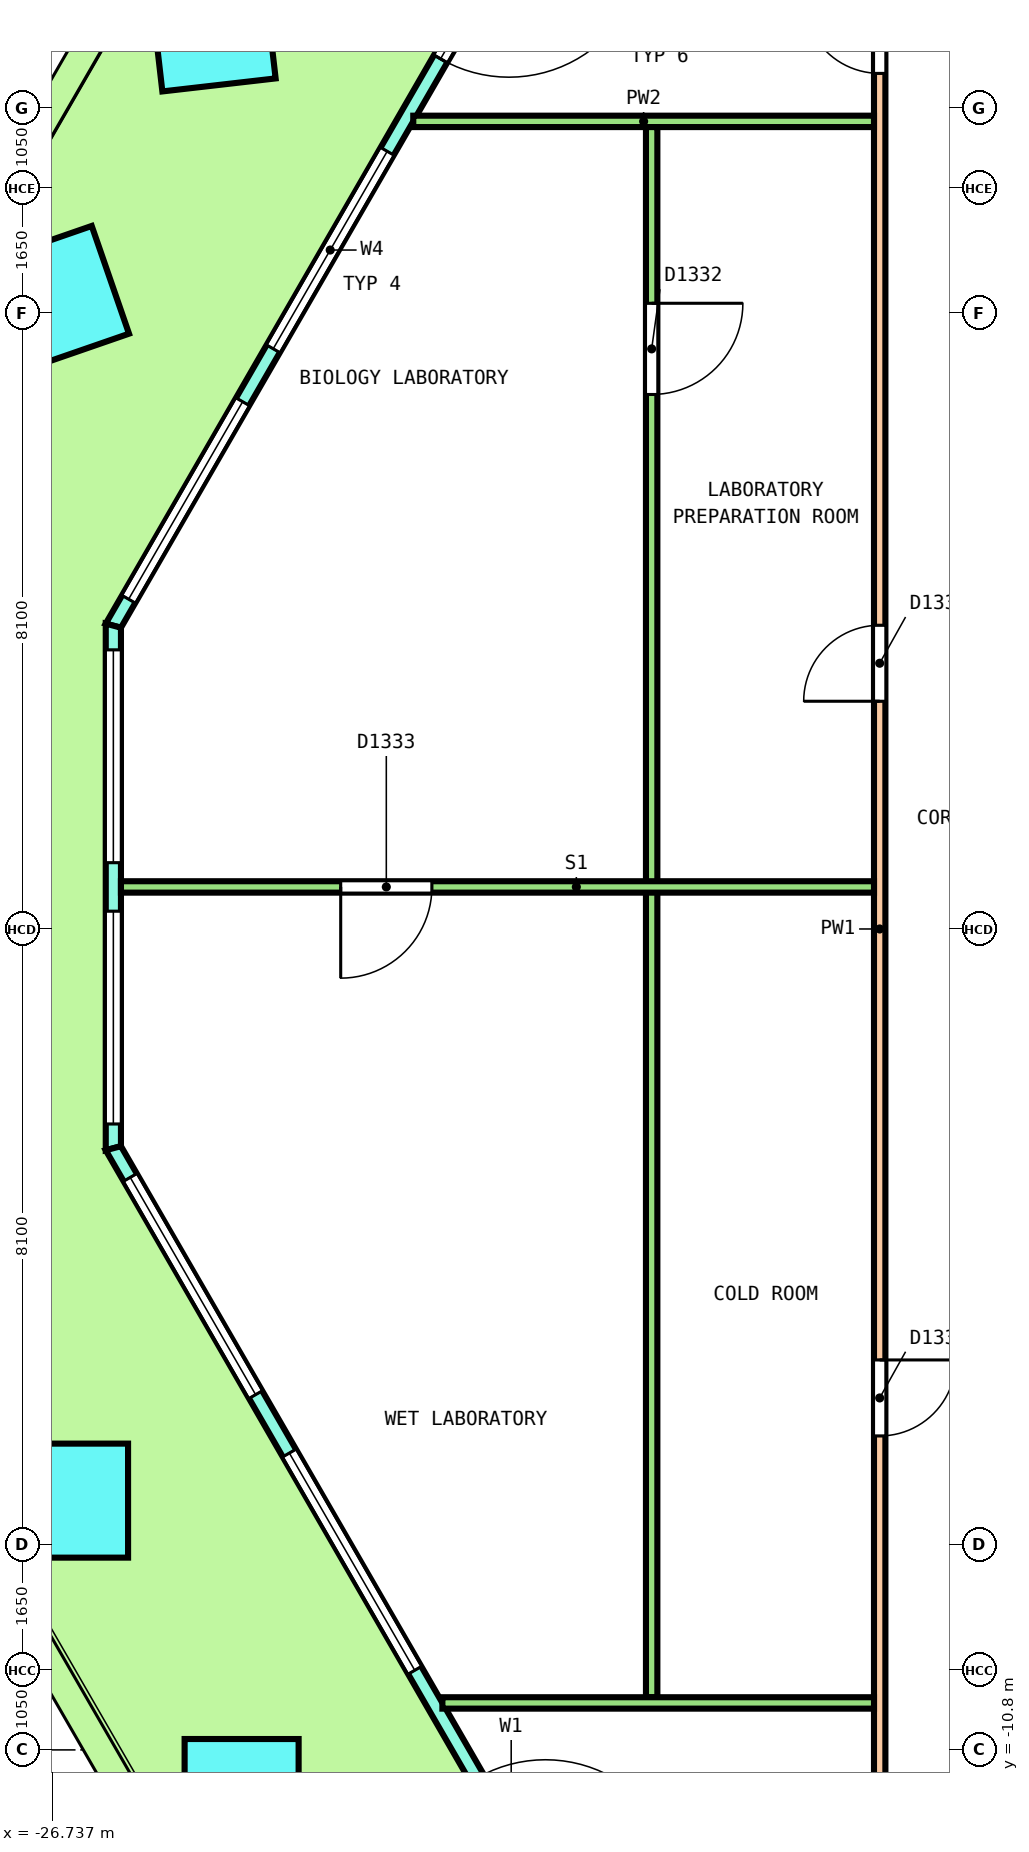
"""IFC4 building model, lengths in metres.
Left out: names, types, materials, properties, quantities, classifications, styles, units other than length and angle.
Written with IfcOpenShell. Run it as: python <this file> out.ifc"""

import sys

from ifc_helpers import new_model, si_unit, direction, frame, frame_2d, origin, origin_2d, place, context, subcontext, project, spatial, polyline, rectangle, outline, extrude, element, fill, save


model = new_model("IFC4")
c1 = context("Model", 3, precision=1e-05, world=origin(), true_north=direction((0.0, 1.0)))
c2 = subcontext(c1, "Body", "Model", "MODEL_VIEW")
j1 = project(units=[si_unit("LENGTHUNIT", "METRE"), si_unit("PLANEANGLEUNIT", "RADIAN")], contexts=[c1])
p1 = place(None, origin())
s1 = spatial("IfcSite", under=j1, at=p1, CompositionType="ELEMENT")
p2 = place(p1, origin())
s2 = spatial("IfcBuilding", under=s1, at=p2, CompositionType="ELEMENT")
p3 = place(p2, frame((0.0, 0.0, 32.2)))
s3 = spatial("IfcBuildingStorey", under=s2, at=p3, CompositionType="ELEMENT", Elevation=32.2)
p4 = place(p3, frame((-24.628, 11.849, 0.0), z_axis=(-0.025365582388, 0.018858497119, 0.999500347332), x_axis=(-0.501191337303, -0.865328971352, 0.0036075963)))
e1 = element("IfcColumn", 1, at=p4, inside=s3, PredefinedType="COLUMN", context=c2, shape_type="SweptSolid", body=[
    extrude(rectangle(XDim=1.5, YDim=1.5, at=origin_2d()), origin(), (0.0, 0.0, 1.0), 4.052),
])
p5 = place(p3, frame((-26.68, 8.295, 0.0), z_axis=(-0.021809609218, 0.025123223878, 0.999446429063), x_axis=(-0.499316957517, -0.86635106376, 0.010881647777)))
e2 = element("IfcColumn", 2, at=p5, inside=s3, PredefinedType="COLUMN", context=c2, shape_type="SweptSolid", body=[
    extrude(rectangle(XDim=1.5, YDim=1.5, at=origin_2d()), origin(), (0.0, 0.0, 1.0), 4.052),
])
p6 = place(p3, frame((-26.488, -7.521, 0.0), z_axis=(-0.010908253887, 0.018863444567, 0.99976256204), x_axis=(0.500638377412, -0.865382225109, 0.021790354016)))
e3 = element("IfcColumn", 3, at=p6, inside=s3, PredefinedType="COLUMN", context=c2, shape_type="SweptSolid", body=[
    extrude(rectangle(XDim=1.5, YDim=1.5, at=origin_2d()), origin(), (0.0, 0.0, 1.0), 4.051),
])
p7 = place(p3, frame((-24.245, -11.407, 0.0), z_axis=(-0.003677036938, 0.006329325876, 0.999973209158), x_axis=(0.502147149997, -0.864751212075, 0.007319901948)))
e4 = element("IfcColumn", 4, at=p7, inside=s3, PredefinedType="COLUMN", context=c2, shape_type="SweptSolid", body=[
    extrude(rectangle(XDim=1.5, YDim=1.5, at=origin_2d()), origin(), (0.0, 0.0, 1.0), 4.05),
])
p8 = place(p3, frame((-16.422, 20.463, 0.0), z_axis=(0.0, 0.0, 1.0), x_axis=(-0.500001707189, -0.866024418136, 0.0)))
e5 = element("IfcWall", 5, at=p8, inside=s3, PredefinedType="SOLIDWALL", context=c2, shape_type="SweptSolid", body=[
    extrude(outline(polyline([(-0.027, -0.1), (0.977, -0.1), (1.981, -0.1), (2.985, -0.1), (3.989, -0.1), (4.993, -0.1), (5.997, -0.1), (7.0, -0.1), (8.004, -0.1), (9.008, -0.1), (10.012, -0.1), (11.016, -0.1), (12.02, -0.1), (13.024, -0.1), (14.028, -0.1), (15.032, -0.1), (16.036, -0.1), (17.04, -0.1), (18.043, -0.1), (19.047, -0.1), (18.994, 0.1), (17.995, 0.1), (16.997, 0.1), (15.999, 0.1), (15.001, 0.1), (14.002, 0.1), (13.004, 0.1), (12.006, 0.1), (11.008, 0.1), (10.009, 0.1), (9.011, 0.1), (8.013, 0.1), (7.015, 0.1), (6.016, 0.1), (5.018, 0.1), (4.02, 0.1), (3.022, 0.1), (2.023, 0.1), (1.025, 0.1), (0.027, 0.1), (-0.027, -0.1)])), origin(), (0.0, 0.0, 1.0), 4.1),
])
p9 = place(p8, frame((0.402, 0.0, 0.1)))
e6 = element("IfcOpeningElement", 6, at=p9, cuts=e5, PredefinedType="OPENING", context=c2, shape_type="SweptSolid", body=[
    extrude(rectangle(XDim=3.0, YDim=2.9, at=frame_2d((1.5, 1.45))), frame((0.0, 0.11, 0.0), z_axis=(0.0, -1.0, 0.0), x_axis=(1.0, 0.0, 0.0)), (0.0, 0.0, 1.0), 0.22),
])
p10 = place(p8, frame((4.206, 0.0, 0.1)))
e7 = element("IfcOpeningElement", 7, at=p10, cuts=e5, PredefinedType="OPENING", context=c2, shape_type="SweptSolid", body=[
    extrude(rectangle(XDim=3.0, YDim=2.9, at=frame_2d((1.5, 1.45))), frame((0.0, 0.11, 0.0), z_axis=(0.0, -1.0, 0.0), x_axis=(1.0, 0.0, 0.0)), (0.0, 0.0, 1.0), 0.22),
])
p11 = place(p8, frame((8.61, 0.0, 0.0)))
e8 = element("IfcOpeningElement", 8, at=p11, cuts=e5, PredefinedType="OPENING", context=c2, shape_type="SweptSolid", body=[
    extrude(rectangle(XDim=1.8, YDim=2.4, at=frame_2d((0.9, 1.2))), frame((0.0, 0.11, 0.0), z_axis=(0.0, -1.0, 0.0), x_axis=(1.0, 0.0, 0.0)), (0.0, 0.0, 1.0), 0.22),
])
p12 = place(p8, frame((8.61, 0.0, 2.55)))
e9 = element("IfcOpeningElement", 9, at=p12, cuts=e5, PredefinedType="OPENING", context=c2, shape_type="SweptSolid", body=[
    extrude(rectangle(XDim=1.8, YDim=0.45, at=frame_2d((0.9, 0.225))), frame((0.0, 0.11, 0.0), z_axis=(0.0, -1.0, 0.0), x_axis=(1.0, 0.0, 0.0)), (0.0, 0.0, 1.0), 0.22),
])
p13 = place(p8, frame((11.814, 0.0, 0.1)))
e10 = element("IfcOpeningElement", 10, at=p13, cuts=e5, PredefinedType="OPENING", context=c2, shape_type="SweptSolid", body=[
    extrude(rectangle(XDim=3.0, YDim=2.9, at=frame_2d((1.5, 1.45))), frame((0.0, 0.11, 0.0), z_axis=(0.0, -1.0, 0.0), x_axis=(1.0, 0.0, 0.0)), (0.0, 0.0, 1.0), 0.22),
])
p14 = place(p8, frame((15.618, 0.0, 0.1)))
e11 = element("IfcOpeningElement", 11, at=p14, cuts=e5, PredefinedType="OPENING", context=c2, shape_type="SweptSolid", body=[
    extrude(rectangle(XDim=3.0, YDim=2.9, at=frame_2d((1.5, 1.45))), frame((0.0, 0.11, 0.0), z_axis=(0.0, -1.0, 0.0), x_axis=(1.0, 0.0, 0.0)), (0.0, 0.0, 1.0), 0.22),
])
p15 = place(p3, frame((-25.932, 3.99, 0.0), z_axis=(0.0, 0.0, 1.0), x_axis=(0.0, -1.0, 0.0)))
e12 = element("IfcWall", 12, at=p15, inside=s3, PredefinedType="SOLIDWALL", context=c2, shape_type="SweptSolid", body=[
    extrude(outline(polyline([(-0.027, -0.1), (1.128, -0.1), (2.283, -0.1), (3.438, -0.1), (4.592, -0.1), (5.747, -0.1), (6.902, -0.1), (6.848, 0.1), (5.711, 0.1), (4.574, 0.1), (3.438, 0.1), (2.301, 0.1), (1.164, 0.1), (0.027, 0.1), (-0.027, -0.1)])), origin(), (0.0, 0.0, 1.0), 4.1),
])
p16 = place(p15, frame((0.319, 0.0, 0.1)))
e13 = element("IfcOpeningElement", 13, at=p16, cuts=e12, PredefinedType="OPENING", context=c2, shape_type="SweptSolid", body=[
    extrude(rectangle(XDim=2.8, YDim=2.9, at=frame_2d((1.4, 1.45))), frame((0.0, 0.11, 0.0), z_axis=(0.0, -1.0, 0.0), x_axis=(1.0, 0.0, 0.0)), (0.0, 0.0, 1.0), 0.22),
])
p17 = place(p15, frame((3.756, 0.0, 0.1)))
e14 = element("IfcOpeningElement", 14, at=p17, cuts=e12, PredefinedType="OPENING", context=c2, shape_type="SweptSolid", body=[
    extrude(rectangle(XDim=2.8, YDim=2.9, at=frame_2d((1.4, 1.45))), frame((0.0, 0.11, 0.0), z_axis=(0.0, -1.0, 0.0), x_axis=(1.0, 0.0, 0.0)), (0.0, 0.0, 1.0), 0.22),
])
p18 = place(p3, frame((-25.932, -2.884, 0.0), z_axis=(0.0, 0.0, 1.0), x_axis=(0.499999366442, -0.866025769569, 0.0)))
e15 = element("IfcWall", 15, at=p18, inside=s3, PredefinedType="SOLIDWALL", context=c2, shape_type="SweptSolid", body=[
    extrude(outline(polyline([(-0.027, -0.1), (1.023, -0.1), (2.072, -0.1), (3.122, -0.1), (4.171, -0.1), (5.221, -0.1), (6.27, -0.1), (7.32, -0.1), (8.369, -0.1), (9.419, -0.1), (10.468, -0.1), (11.518, -0.1), (12.567, -0.1), (13.617, -0.1), (14.666, -0.1), (15.716, -0.1), (16.765, -0.1), (17.815, -0.1), (18.864, -0.1), (19.914, -0.1), (20.963, -0.1), (20.91, 0.1), (19.865, 0.1), (18.821, 0.1), (17.777, 0.1), (16.733, 0.1), (15.689, 0.1), (14.645, 0.1), (13.601, 0.1), (12.557, 0.1), (11.512, 0.1), (10.468, 0.1), (9.424, 0.1), (8.38, 0.1), (7.336, 0.1), (6.292, 0.1), (5.248, 0.1), (4.203, 0.1), (3.159, 0.1), (2.115, 0.1), (1.071, 0.1), (0.027, 0.1), (-0.027, -0.1)])), origin(), (0.0, 0.0, 1.0), 4.1),
])
p19 = place(p18, frame((0.444, 0.0, 0.1)))
e16 = element("IfcOpeningElement", 16, at=p19, cuts=e15, PredefinedType="OPENING", context=c2, shape_type="SweptSolid", body=[
    extrude(rectangle(XDim=3.3, YDim=2.9, at=frame_2d((1.65, 1.45))), frame((0.0, 0.11, 0.0), z_axis=(0.0, -1.0, 0.0), x_axis=(1.0, 0.0, 0.0)), (0.0, 0.0, 1.0), 0.22),
])
p20 = place(p18, frame((4.631, 0.0, 0.1)))
e17 = element("IfcOpeningElement", 17, at=p20, cuts=e15, PredefinedType="OPENING", context=c2, shape_type="SweptSolid", body=[
    extrude(rectangle(XDim=3.3, YDim=2.9, at=frame_2d((1.65, 1.45))), frame((0.0, 0.11, 0.0), z_axis=(0.0, -1.0, 0.0), x_axis=(1.0, 0.0, 0.0)), (0.0, 0.0, 1.0), 0.22),
])
p21 = place(p18, frame((9.568, 0.0, 0.0)))
e18 = element("IfcOpeningElement", 18, at=p21, cuts=e15, PredefinedType="OPENING", context=c2, shape_type="SweptSolid", body=[
    extrude(rectangle(XDim=1.8, YDim=2.4, at=frame_2d((0.9, 1.2))), frame((0.0, 0.11, 0.0), z_axis=(0.0, -1.0, 0.0), x_axis=(1.0, 0.0, 0.0)), (0.0, 0.0, 1.0), 0.22),
])
p22 = place(p18, frame((9.568, 0.0, 2.55)))
e19 = element("IfcOpeningElement", 19, at=p22, cuts=e15, PredefinedType="OPENING", context=c2, shape_type="SweptSolid", body=[
    extrude(rectangle(XDim=1.8, YDim=0.45, at=frame_2d((0.9, 0.225))), frame((0.0, 0.11, 0.0), z_axis=(0.0, -1.0, 0.0), x_axis=(1.0, 0.0, 0.0)), (0.0, 0.0, 1.0), 0.22),
])
p23 = place(p18, frame((13.006, 0.0, 0.1)))
e20 = element("IfcOpeningElement", 20, at=p23, cuts=e15, PredefinedType="OPENING", context=c2, shape_type="SweptSolid", body=[
    extrude(rectangle(XDim=3.3, YDim=2.9, at=frame_2d((1.65, 1.45))), frame((0.0, 0.11, 0.0), z_axis=(0.0, -1.0, 0.0), x_axis=(1.0, 0.0, 0.0)), (0.0, 0.0, 1.0), 0.22),
])
p24 = place(p18, frame((17.193, 0.0, 0.1)))
e21 = element("IfcOpeningElement", 21, at=p24, cuts=e15, PredefinedType="OPENING", context=c2, shape_type="SweptSolid", body=[
    extrude(rectangle(XDim=3.3, YDim=2.9, at=frame_2d((1.65, 1.45))), frame((0.0, 0.11, 0.0), z_axis=(0.0, -1.0, 0.0), x_axis=(1.0, 0.0, 0.0)), (0.0, 0.0, 1.0), 0.22),
])
p25 = place(p3, frame((-15.85, -13.375, 0.0), z_axis=(0.0, 0.0, 1.0), x_axis=(0.0, 1.0, 0.0)))
e22 = element("IfcWall", 22, at=p25, inside=s3, PredefinedType="PARTITIONING", context=c2, shape_type="SweptSolid", body=[
    extrude(rectangle(XDim=26.75, YDim=0.15, at=frame_2d((13.375, 0.0))), origin(), (0.0, 0.0, 1.0), 3.05),
])
p26 = place(p25, frame((24.631, 0.0, 0.0)))
e23 = element("IfcOpeningElement", 23, at=p26, cuts=e22, PredefinedType="OPENING", context=c2, shape_type="SweptSolid", body=[
    extrude(rectangle(XDim=1.0, YDim=2.1, at=frame_2d((0.5, 1.05))), frame((0.0, 0.085, 0.0), z_axis=(0.0, -1.0, 0.0), x_axis=(1.0, 0.0, 0.0)), (0.0, 0.0, 1.0), 0.17),
])
p27 = place(p25, frame((16.371, 0.0, 0.0)))
e24 = element("IfcOpeningElement", 24, at=p27, cuts=e22, PredefinedType="OPENING", context=c2, shape_type="SweptSolid", body=[
    extrude(rectangle(XDim=1.0, YDim=2.1, at=frame_2d((0.5, 1.05))), frame((0.0, 0.085, 0.0), z_axis=(0.0, -1.0, 0.0), x_axis=(1.0, 0.0, 0.0)), (0.0, 0.0, 1.0), 0.17),
])
p28 = place(p25, frame((6.705, 0.0, 0.0)))
e25 = element("IfcOpeningElement", 25, at=p28, cuts=e22, PredefinedType="OPENING", context=c2, shape_type="SweptSolid", body=[
    extrude(rectangle(XDim=1.0, YDim=2.1, at=frame_2d((0.5, 1.05))), frame((0.0, 0.085, 0.0), z_axis=(0.0, -1.0, 0.0), x_axis=(1.0, 0.0, 0.0)), (0.0, 0.0, 1.0), 0.17),
])
p29 = place(p3, frame((-21.986, 10.625, 0.0), z_axis=(0.0, 0.0, 1.0), x_axis=(1.0, 0.0, 0.0)))
e26 = element("IfcWall", 26, at=p29, inside=s3, PredefinedType="PARTITIONING", context=c2, shape_type="SweptSolid", body=[
    extrude(rectangle(XDim=6.061, YDim=0.15, at=frame_2d((3.031, 0.0))), origin(), (0.0, 0.0, 1.0), 3.05),
])
p30 = place(p3, frame((-18.85, -10.107, 0.0), z_axis=(0.0, 0.0, 1.0), x_axis=(0.0, 1.0, 0.0)))
e27 = element("IfcWall", 27, at=p30, inside=s3, PredefinedType="PARTITIONING", context=c2, shape_type="SweptSolid", body=[
    extrude(rectangle(XDim=20.657, YDim=0.15, at=frame_2d((10.329, 0.0))), origin(), (0.0, 0.0, 1.0), 3.05),
])
p31 = place(p30, frame((17.139, 0.0, 0.0)))
e28 = element("IfcOpeningElement", 28, at=p31, cuts=e27, PredefinedType="OPENING", context=c2, shape_type="SweptSolid", body=[
    extrude(rectangle(XDim=1.2, YDim=2.1, at=frame_2d((0.6, 1.05))), frame((0.0, 0.085, 0.0), z_axis=(0.0, -1.0, 0.0), x_axis=(1.0, 0.0, 0.0)), (0.0, 0.0, 1.0), 0.17),
])
p32 = place(p3, frame((-25.832, 0.553, 0.0), z_axis=(0.0, 0.0, 1.0), x_axis=(1.0, 0.0, 0.0)))
e29 = element("IfcWall", 29, at=p32, inside=s3, PredefinedType="PARTITIONING", context=c2, shape_type="SweptSolid", body=[
    extrude(rectangle(XDim=9.907, YDim=0.15, at=frame_2d((4.954, 0.0))), origin(), (0.0, 0.0, 1.0), 3.05),
])
p33 = place(p32, frame((2.891, 0.0, 0.0)))
e30 = element("IfcOpeningElement", 30, at=p33, cuts=e29, PredefinedType="OPENING", context=c2, shape_type="SweptSolid", body=[
    extrude(rectangle(XDim=1.2, YDim=2.1, at=frame_2d((0.6, 1.05))), frame((0.0, 0.085, 0.0), z_axis=(0.0, -1.0, 0.0), x_axis=(1.0, 0.0, 0.0)), (0.0, 0.0, 1.0), 0.17),
])
p34 = place(p3, frame((-21.603, -10.182, 0.0), z_axis=(0.0, 0.0, 1.0), x_axis=(1.0, 0.0, 0.0)))
e31 = element("IfcWall", 31, at=p34, inside=s3, PredefinedType="PARTITIONING", context=c2, shape_type="SweptSolid", body=[
    extrude(rectangle(XDim=5.678, YDim=0.15, at=frame_2d((2.839, 0.0))), origin(), (0.0, 0.0, 1.0), 3.05),
])
p35 = place(p11, origin())
e32 = element("IfcDoor", 32, at=p35, inside=s3, OperationType="DOUBLE_DOOR_SINGLE_SWING", PredefinedType="DOOR", context=c2, shape_type="SweptSolid", body=[
    extrude(rectangle(XDim=1.8, YDim=2.4, at=frame_2d((0.9, 1.2))), frame((0.0, 0.025, 0.0), z_axis=(0.0, -1.0, 0.0), x_axis=(1.0, 0.0, 0.0)), (0.0, 0.0, 1.0), 0.05),
])
fill(e8, e32)
p36 = place(p12, origin())
e33 = element("IfcWindow", 33, at=p36, inside=s3, PartitioningType="SINGLE_PANEL", PredefinedType="WINDOW", context=c2, shape_type="SweptSolid", body=[
    extrude(rectangle(XDim=1.8, YDim=0.45, at=frame_2d((0.9, 0.225))), frame((0.0, 0.03, 0.0), z_axis=(0.0, -1.0, 0.0), x_axis=(1.0, 0.0, 0.0)), (0.0, 0.0, 1.0), 0.06),
])
fill(e9, e33)
p37 = place(p13, origin())
e34 = element("IfcWindow", 34, at=p37, inside=s3, PartitioningType="SINGLE_PANEL", PredefinedType="WINDOW", context=c2, shape_type="SweptSolid", body=[
    extrude(rectangle(XDim=3.0, YDim=2.9, at=frame_2d((1.5, 1.45))), frame((0.0, 0.03, 0.0), z_axis=(0.0, -1.0, 0.0), x_axis=(1.0, 0.0, 0.0)), (0.0, 0.0, 1.0), 0.06),
])
fill(e10, e34)
p38 = place(p14, origin())
e35 = element("IfcWindow", 35, at=p38, inside=s3, PartitioningType="SINGLE_PANEL", PredefinedType="WINDOW", context=c2, shape_type="SweptSolid", body=[
    extrude(rectangle(XDim=3.0, YDim=2.9, at=frame_2d((1.5, 1.45))), frame((0.0, 0.03, 0.0), z_axis=(0.0, -1.0, 0.0), x_axis=(1.0, 0.0, 0.0)), (0.0, 0.0, 1.0), 0.06),
])
fill(e11, e35)
p39 = place(p16, origin())
e36 = element("IfcWindow", 36, at=p39, inside=s3, PartitioningType="SINGLE_PANEL", PredefinedType="WINDOW", context=c2, shape_type="SweptSolid", body=[
    extrude(rectangle(XDim=2.8, YDim=2.9, at=frame_2d((1.4, 1.45))), frame((0.0, 0.03, 0.0), z_axis=(0.0, -1.0, 0.0), x_axis=(1.0, 0.0, 0.0)), (0.0, 0.0, 1.0), 0.06),
])
fill(e13, e36)
p40 = place(p17, origin())
e37 = element("IfcWindow", 37, at=p40, inside=s3, PartitioningType="SINGLE_PANEL", PredefinedType="WINDOW", context=c2, shape_type="SweptSolid", body=[
    extrude(rectangle(XDim=2.8, YDim=2.9, at=frame_2d((1.4, 1.45))), frame((0.0, 0.03, 0.0), z_axis=(0.0, -1.0, 0.0), x_axis=(1.0, 0.0, 0.0)), (0.0, 0.0, 1.0), 0.06),
])
fill(e14, e37)
p41 = place(p19, origin())
e38 = element("IfcWindow", 38, at=p41, inside=s3, PartitioningType="SINGLE_PANEL", PredefinedType="WINDOW", context=c2, shape_type="SweptSolid", body=[
    extrude(rectangle(XDim=3.3, YDim=2.9, at=frame_2d((1.65, 1.45))), frame((0.0, 0.03, 0.0), z_axis=(0.0, -1.0, 0.0), x_axis=(1.0, 0.0, 0.0)), (0.0, 0.0, 1.0), 0.06),
])
fill(e16, e38)
p42 = place(p20, origin())
e39 = element("IfcWindow", 39, at=p42, inside=s3, PartitioningType="SINGLE_PANEL", PredefinedType="WINDOW", context=c2, shape_type="SweptSolid", body=[
    extrude(rectangle(XDim=3.3, YDim=2.9, at=frame_2d((1.65, 1.45))), frame((0.0, 0.03, 0.0), z_axis=(0.0, -1.0, 0.0), x_axis=(1.0, 0.0, 0.0)), (0.0, 0.0, 1.0), 0.06),
])
fill(e17, e39)
p43 = place(p26, origin())
e40 = element("IfcDoor", 40, at=p43, inside=s3, OperationType="SINGLE_SWING_LEFT", PredefinedType="DOOR", context=c2, shape_type="SweptSolid", body=[
    extrude(rectangle(XDim=1.0, YDim=2.1, at=frame_2d((0.5, 1.05))), frame((0.0, 0.025, 0.0), z_axis=(0.0, -1.0, 0.0), x_axis=(1.0, 0.0, 0.0)), (0.0, 0.0, 1.0), 0.05),
])
fill(e23, e40)
p44 = place(p27, origin())
e41 = element("IfcDoor", 41, at=p44, inside=s3, OperationType="SINGLE_SWING_RIGHT", PredefinedType="DOOR", context=c2, shape_type="SweptSolid", body=[
    extrude(rectangle(XDim=1.0, YDim=2.1, at=frame_2d((0.5, 1.05))), frame((0.0, 0.025, 0.0), z_axis=(0.0, -1.0, 0.0), x_axis=(1.0, 0.0, 0.0)), (0.0, 0.0, 1.0), 0.05),
])
fill(e24, e41)
p45 = place(p31, origin())
e42 = element("IfcDoor", 42, at=p45, inside=s3, OperationType="DOUBLE_DOOR_SINGLE_SWING", PredefinedType="DOOR", context=c2, shape_type="SweptSolid", body=[
    extrude(rectangle(XDim=1.2, YDim=2.1, at=frame_2d((0.6, 1.05))), frame((0.0, 0.025, 0.0), z_axis=(0.0, -1.0, 0.0), x_axis=(1.0, 0.0, 0.0)), (0.0, 0.0, 1.0), 0.05),
])
fill(e28, e42)
p46 = place(p33, origin())
e43 = element("IfcDoor", 43, at=p46, inside=s3, OperationType="DOUBLE_DOOR_SINGLE_SWING", PredefinedType="DOOR", context=c2, shape_type="SweptSolid", body=[
    extrude(rectangle(XDim=1.2, YDim=2.1, at=frame_2d((0.6, 1.05))), frame((0.0, 0.025, 0.0), z_axis=(0.0, -1.0, 0.0), x_axis=(1.0, 0.0, 0.0)), (0.0, 0.0, 1.0), 0.05),
])
fill(e30, e43)
p47 = place(p28, origin())
e44 = element("IfcDoor", 44, at=p47, inside=s3, OperationType="SINGLE_SWING_LEFT", PredefinedType="DOOR", context=c2, shape_type="SweptSolid", body=[
    extrude(rectangle(XDim=1.0, YDim=2.1, at=frame_2d((0.5, 1.05))), frame((0.0, 0.025, 0.0), z_axis=(0.0, -1.0, 0.0), x_axis=(1.0, 0.0, 0.0)), (0.0, 0.0, 1.0), 0.05),
])
fill(e25, e44)
save(model, sys.argv[1])
